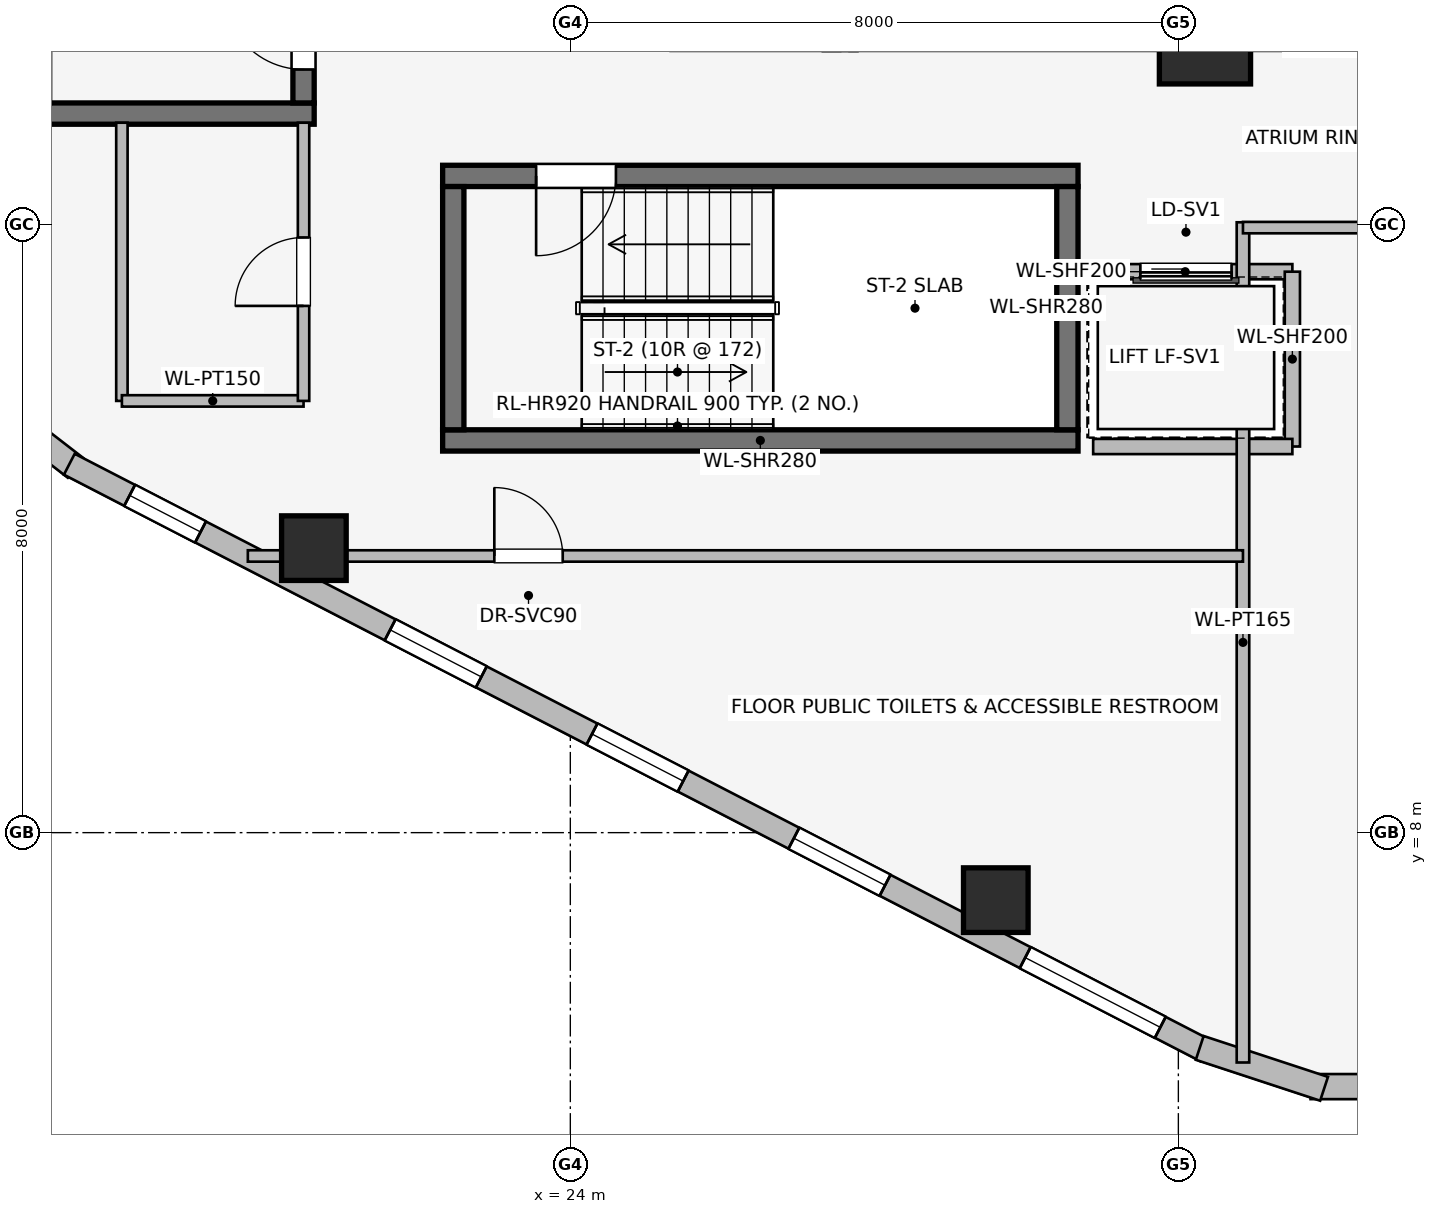
"""IFC4 building model, lengths in metres.
Left out: names, types, materials, properties, quantities, classifications, styles, units other than length and angle.
Written with IfcOpenShell. Run it as: python <this file> out.ifc"""

import sys

from ifc_helpers import new_model, si_unit, direction, frame, frame_2d, origin, origin_2d, place, context, subcontext, project, spatial, rectangle, extrude, element, fill, save


model = new_model("IFC4")
c1 = context("Model", 3, precision=1e-05, world=origin(), true_north=direction((0.0, 1.0)))
c2 = subcontext(c1, "Body", "Model", "MODEL_VIEW")
j1 = project(units=[si_unit("LENGTHUNIT", "METRE"), si_unit("PLANEANGLEUNIT", "RADIAN")], contexts=[c1])
p1 = place(None, origin())
s1 = spatial("IfcSite", under=j1, at=p1, CompositionType="ELEMENT")
p2 = place(p1, origin())
s2 = spatial("IfcBuilding", under=s1, at=p2, CompositionType="ELEMENT")
p3 = place(p2, frame((0.0, 0.0, 206.8)))
s3 = spatial("IfcBuildingStorey", under=s2, at=p3, CompositionType="ELEMENT", Elevation=206.8)
p4 = place(p3, frame((16.87, 17.46, 0.0), z_axis=(0.0, 0.0, 1.0), x_axis=(1.0, 0.0, 0.0)))
e1 = element("IfcWall", 1, at=p4, inside=s3, PredefinedType="SHEAR", context=c2, shape_type="SweptSolid", body=[
    extrude(rectangle(XDim=3.76, YDim=0.28, at=frame_2d((1.88, 0.0))), origin(), (0.0, 0.0, 1.0), 3.45),
])
p5 = place(p3, frame((20.49, 17.6, 0.0), z_axis=(0.0, 0.0, 1.0), x_axis=(0.0, 1.0, 0.0)))
e2 = element("IfcWall", 2, at=p5, inside=s3, PredefinedType="SHEAR", context=c2, shape_type="SweptSolid", body=[
    extrude(rectangle(XDim=7.8, YDim=0.28, at=frame_2d((3.9, 0.0))), origin(), (0.0, 0.0, 1.0), 3.45),
])
p6 = place(p5, frame((0.44, 0.0, 0.0)))
e3 = element("IfcOpeningElement", 3, at=p6, cuts=e2, PredefinedType="OPENING", context=c2, shape_type="SweptSolid", body=[
    extrude(rectangle(XDim=1.05, YDim=2.0, at=frame_2d((0.525, 1.0))), frame((0.0, 0.15, 0.0), z_axis=(0.0, -1.0, 0.0), x_axis=(1.0, 0.0, 0.0)), (0.0, 0.0, 1.0), 0.3),
])
p7 = place(p3, frame((22.32, 13.16, 0.0), z_axis=(0.0, 0.0, 1.0), x_axis=(1.0, 0.0, 0.0)))
e4 = element("IfcWall", 4, at=p7, inside=s3, PredefinedType="SHEAR", context=c2, shape_type="SweptSolid", body=[
    extrude(rectangle(XDim=8.36, YDim=0.28, at=frame_2d((4.18, 0.0))), origin(), (0.0, 0.0, 1.0), 3.45),
])
p8 = place(p3, frame((30.68, 16.64, 0.0), z_axis=(0.0, 0.0, 1.0), x_axis=(-1.0, 0.0, 0.0)))
e5 = element("IfcWall", 5, at=p8, inside=s3, PredefinedType="SHEAR", context=c2, shape_type="SweptSolid", body=[
    extrude(rectangle(XDim=8.36, YDim=0.28, at=frame_2d((4.18, 0.0))), origin(), (0.0, 0.0, 1.0), 3.45),
])
p9 = place(p8, frame((6.08, 0.0, 0.0)))
e6 = element("IfcOpeningElement", 6, at=p9, cuts=e5, PredefinedType="OPENING", context=c2, shape_type="SweptSolid", body=[
    extrude(rectangle(XDim=1.05, YDim=2.0, at=frame_2d((0.525, 1.0))), frame((0.0, 0.15, 0.0), z_axis=(0.0, -1.0, 0.0), x_axis=(1.0, 0.0, 0.0)), (0.0, 0.0, 1.0), 0.3),
])
for number, where, z_axis, x_axis in (
    (7, (22.46, 16.5, 0.0), (0.0, 0.0, 1.0), (0.0, -1.0, 0.0)),
    (8, (30.54, 13.3, 0.0), (0.0, 0.0, 1.0), (0.0, 1.0, 0.0)),
):
    element("IfcWall", number, at=place(p3, frame(where, z_axis=z_axis, x_axis=x_axis)), inside=s3, PredefinedType="SHEAR", context=c2, shape_type="SweptSolid", body=[
        extrude(rectangle(XDim=3.2, YDim=0.28, at=frame_2d((1.6, 0.0))), origin(), (0.0, 0.0, 1.0), 3.45),
    ])
p10 = place(p3, frame((32.35, 18.45, 0.0), z_axis=(0.0, 0.0, 1.0), x_axis=(1.0, 0.0, 0.0)))
e9 = element("IfcColumn", 9, at=p10, inside=s3, PredefinedType="COLUMN", context=c2, shape_type="SweptSolid", body=[
    extrude(rectangle(XDim=1.2, YDim=1.2, at=origin_2d()), origin(), (0.0, 0.0, 1.0), 3.45),
])
for number, where, z_axis, x_axis in (
    (10, (20.626, 11.743, 0.0), (0.0, 0.0, 1.0), (1.0, 0.0, 0.0)),
    (11, (29.598, 7.112, 0.0), (0.0, 0.0, 1.0), (1.0, 0.0, 0.0)),
):
    element("IfcColumn", number, at=place(p3, frame(where, z_axis=z_axis, x_axis=x_axis)), inside=s3, PredefinedType="COLUMN", context=c2, shape_type="SweptSolid", body=[
        extrude(rectangle(XDim=0.85, YDim=0.85, at=origin_2d()), origin(), (0.0, 0.0, 1.0), 3.45),
    ])
p11 = place(p3, frame((17.489, 12.8, 0.0), z_axis=(0.0, 0.0, 1.0), x_axis=(-0.791409877269, 0.611285862884, 0.0)))
e12 = element("IfcWall", 12, at=p11, inside=s3, PredefinedType="STANDARD", context=c2, shape_type="SweptSolid", body=[
    extrude(rectangle(XDim=1.677, YDim=0.33, at=frame_2d((0.838, 0.0))), origin(), (0.0, 0.0, 1.0), 3.19),
])
p12 = place(p3, frame((32.362, 5.129, 0.0), z_axis=(0.0, 0.0, 1.0), x_axis=(-0.888626188278, 0.458632202867, 0.0)))
e13 = element("IfcWall", 13, at=p12, inside=s3, PredefinedType="STANDARD", context=c2, shape_type="SweptSolid", body=[
    extrude(rectangle(XDim=16.828, YDim=0.31, at=frame_2d((8.414, 0.0))), origin(), (0.0, 0.0, 1.0), 3.19),
])
p13 = place(p12, frame((0.675, 0.0, 0.75)))
e14 = element("IfcOpeningElement", 14, at=p13, cuts=e13, PredefinedType="OPENING", context=c2, shape_type="SweptSolid", body=[
    extrude(rectangle(XDim=2.0, YDim=1.5, at=frame_2d((1.0, 0.75))), frame((0.0, 0.165, 0.0), z_axis=(0.0, -1.0, 0.0), x_axis=(1.0, 0.0, 0.0)), (0.0, 0.0, 1.0), 0.33),
])
p14 = place(p12, frame((4.75, 0.0, 0.75)))
e15 = element("IfcOpeningElement", 15, at=p14, cuts=e13, PredefinedType="OPENING", context=c2, shape_type="SweptSolid", body=[
    extrude(rectangle(XDim=1.35, YDim=1.45, at=frame_2d((0.675, 0.725))), frame((0.0, 0.165, 0.0), z_axis=(0.0, -1.0, 0.0), x_axis=(1.0, 0.0, 0.0)), (0.0, 0.0, 1.0), 0.33),
])
p15 = place(p12, frame((7.739, 0.0, 0.75)))
e16 = element("IfcOpeningElement", 16, at=p15, cuts=e13, PredefinedType="OPENING", context=c2, shape_type="SweptSolid", body=[
    extrude(rectangle(XDim=1.35, YDim=1.45, at=frame_2d((0.675, 0.725))), frame((0.0, 0.165, 0.0), z_axis=(0.0, -1.0, 0.0), x_axis=(1.0, 0.0, 0.0)), (0.0, 0.0, 1.0), 0.33),
])
p16 = place(p12, frame((10.728, 0.0, 0.75)))
e17 = element("IfcOpeningElement", 17, at=p16, cuts=e13, PredefinedType="OPENING", context=c2, shape_type="SweptSolid", body=[
    extrude(rectangle(XDim=1.35, YDim=1.45, at=frame_2d((0.675, 0.725))), frame((0.0, 0.165, 0.0), z_axis=(0.0, -1.0, 0.0), x_axis=(1.0, 0.0, 0.0)), (0.0, 0.0, 1.0), 0.33),
])
p17 = place(p12, frame((14.885, 0.0, 0.75)))
e18 = element("IfcOpeningElement", 18, at=p17, cuts=e13, PredefinedType="OPENING", context=c2, shape_type="SweptSolid", body=[
    extrude(rectangle(XDim=1.05, YDim=1.4, at=frame_2d((0.525, 0.7))), frame((0.0, 0.165, 0.0), z_axis=(0.0, -1.0, 0.0), x_axis=(1.0, 0.0, 0.0)), (0.0, 0.0, 1.0), 0.33),
])
p18 = place(p3, frame((35.461, 4.659, 0.0), z_axis=(0.0, 0.0, 1.0), x_axis=(-1.0, 0.0, 0.0)))
e19 = element("IfcWall", 19, at=p18, inside=s3, PredefinedType="STANDARD", context=c2, shape_type="SweptSolid", body=[
    extrude(rectangle(XDim=1.722, YDim=0.33, at=frame_2d((0.861, 0.0))), origin(), (0.0, 0.0, 1.0), 3.19),
])
p19 = place(p3, frame((33.917, 4.63, 0.0), z_axis=(0.0, 0.0, 1.0), x_axis=(-0.949937416267, 0.312440242569, 0.0)))
e20 = element("IfcWall", 20, at=p19, inside=s3, PredefinedType="STANDARD", context=c2, shape_type="SweptSolid", body=[
    extrude(rectangle(XDim=1.722, YDim=0.33, at=frame_2d((0.861, 0.0))), origin(), (0.0, 0.0, 1.0), 3.19),
])
p20 = place(p3, frame((33.5, 15.38, 0.0), z_axis=(0.0, 0.0, 1.0), x_axis=(-1.0, 0.0, 0.0)))
e21 = element("IfcWall", 21, at=p20, inside=s3, PredefinedType="PARTITIONING", context=c2, shape_type="SweptSolid", body=[
    extrude(rectangle(XDim=2.82, YDim=0.2, at=frame_2d((1.41, 0.0))), origin(), (0.0, 0.0, 1.0), 3.19),
])
p21 = place(p20, frame((0.8, 0.0, 0.0)))
e22 = element("IfcOpeningElement", 22, at=p21, cuts=e21, PredefinedType="OPENING", context=c2, shape_type="SweptSolid", body=[
    extrude(rectangle(XDim=1.2, YDim=2.2, at=frame_2d((0.6, 1.1))), frame((0.0, 0.11, 0.0), z_axis=(0.0, -1.0, 0.0), x_axis=(1.0, 0.0, 0.0)), (0.0, 0.0, 1.0), 0.22),
])
p22 = place(p3, frame((33.5, 13.08, 0.0), z_axis=(0.0, 0.0, 1.0), x_axis=(0.0, 1.0, 0.0)))
e23 = element("IfcWall", 23, at=p22, inside=s3, PredefinedType="PARTITIONING", context=c2, shape_type="SweptSolid", body=[
    extrude(rectangle(XDim=2.3, YDim=0.2, at=frame_2d((1.15, 0.0))), origin(), (0.0, 0.0, 1.0), 3.19),
])
p23 = place(p3, frame((30.879, 13.08, 0.0), z_axis=(0.0, 0.0, 1.0), x_axis=(1.0, 0.0, 0.0)))
e24 = element("IfcWall", 24, at=p23, inside=s3, PredefinedType="PARTITIONING", context=c2, shape_type="SweptSolid", body=[
    extrude(rectangle(XDim=2.621, YDim=0.2, at=frame_2d((1.311, 0.0))), origin(), (0.0, 0.0, 1.0), 3.19),
])
p24 = place(p3, frame((18.1, 17.34, 0.0), z_axis=(0.0, 0.0, 1.0), x_axis=(0.0, -1.0, 0.0)))
e25 = element("IfcWall", 25, at=p24, inside=s3, PredefinedType="PARTITIONING", context=c2, shape_type="SweptSolid", body=[
    extrude(rectangle(XDim=3.66, YDim=0.15, at=frame_2d((1.83, 0.0))), origin(), (0.0, 0.0, 1.0), 3.19),
])
p25 = place(p3, frame((18.1, 13.68, 0.0), z_axis=(0.0, 0.0, 1.0), x_axis=(1.0, 0.0, 0.0)))
e26 = element("IfcWall", 26, at=p25, inside=s3, PredefinedType="PARTITIONING", context=c2, shape_type="SweptSolid", body=[
    extrude(rectangle(XDim=2.39, YDim=0.15, at=frame_2d((1.195, 0.0))), origin(), (0.0, 0.0, 1.0), 3.19),
])
p26 = place(p3, frame((20.49, 13.68, 0.0), z_axis=(0.0, 0.0, 1.0), x_axis=(0.0, 1.0, 0.0)))
e27 = element("IfcWall", 27, at=p26, inside=s3, PredefinedType="PARTITIONING", context=c2, shape_type="SweptSolid", body=[
    extrude(rectangle(XDim=3.66, YDim=0.15, at=frame_2d((1.83, 0.0))), origin(), (0.0, 0.0, 1.0), 3.19),
])
p27 = place(p26, frame((1.25, 0.0, 0.0)))
e28 = element("IfcOpeningElement", 28, at=p27, cuts=e27, PredefinedType="OPENING", context=c2, shape_type="SweptSolid", body=[
    extrude(rectangle(XDim=0.9, YDim=2.0, at=frame_2d((0.45, 1.0))), frame((0.0, 0.085, 0.0), z_axis=(0.0, -1.0, 0.0), x_axis=(1.0, 0.0, 0.0)), (0.0, 0.0, 1.0), 0.17),
])
p28 = place(p3, frame((32.85, 4.976, 0.0), z_axis=(0.0, 0.0, 1.0), x_axis=(0.0, 1.0, 0.0)))
e29 = element("IfcWall", 29, at=p28, inside=s3, PredefinedType="PARTITIONING", context=c2, shape_type="SweptSolid", body=[
    extrude(rectangle(XDim=11.054, YDim=0.165, at=frame_2d((5.527, 0.0))), origin(), (0.0, 0.0, 1.0), 3.19),
])
p29 = place(p3, frame((19.757, 11.64, 0.0), z_axis=(0.0, 0.0, 1.0), x_axis=(1.0, 0.0, 0.0)))
e30 = element("IfcWall", 30, at=p29, inside=s3, PredefinedType="PARTITIONING", context=c2, shape_type="SweptSolid", body=[
    extrude(rectangle(XDim=13.093, YDim=0.15, at=frame_2d((6.546, 0.0))), origin(), (0.0, 0.0, 1.0), 3.19),
])
p30 = place(p29, frame((3.243, 0.0, 0.0)))
e31 = element("IfcOpeningElement", 31, at=p30, cuts=e30, PredefinedType="OPENING", context=c2, shape_type="SweptSolid", body=[
    extrude(rectangle(XDim=0.9, YDim=2.0, at=frame_2d((0.45, 1.0))), frame((0.0, 0.085, 0.0), z_axis=(0.0, -1.0, 0.0), x_axis=(1.0, 0.0, 0.0)), (0.0, 0.0, 1.0), 0.17),
])
p31 = place(p3, frame((32.85, 15.96, 0.0), z_axis=(0.0, 0.0, 1.0), x_axis=(1.0, 0.0, 0.0)))
e32 = element("IfcWall", 32, at=p31, inside=s3, PredefinedType="PARTITIONING", context=c2, shape_type="SweptSolid", body=[
    extrude(rectangle(XDim=8.61, YDim=0.15, at=frame_2d((4.305, 0.0))), origin(), (0.0, 0.0, 1.0), 3.19),
])
p32 = place(p31, frame((3.825, 0.0, 0.0)))
e33 = element("IfcOpeningElement", 33, at=p32, cuts=e32, PredefinedType="OPENING", context=c2, shape_type="SweptSolid", body=[
    extrude(rectangle(XDim=0.96, YDim=2.0, at=frame_2d((0.48, 1.0))), frame((0.0, 0.085, 0.0), z_axis=(0.0, -1.0, 0.0), x_axis=(1.0, 0.0, 0.0)), (0.0, 0.0, 1.0), 0.17),
])
p33 = place(p13, origin())
e34 = element("IfcWindow", 34, at=p33, inside=s3, PartitioningType="SINGLE_PANEL", PredefinedType="WINDOW", context=c2, shape_type="SweptSolid", body=[
    extrude(rectangle(XDim=2.0, YDim=1.5, at=frame_2d((1.0, 0.75))), frame((0.0, 0.03, 0.0), z_axis=(0.0, -1.0, 0.0), x_axis=(1.0, 0.0, 0.0)), (0.0, 0.0, 1.0), 0.06),
])
fill(e14, e34)
p34 = place(p14, origin())
e35 = element("IfcWindow", 35, at=p34, inside=s3, PartitioningType="SINGLE_PANEL", PredefinedType="WINDOW", context=c2, shape_type="SweptSolid", body=[
    extrude(rectangle(XDim=1.35, YDim=1.45, at=frame_2d((0.675, 0.725))), frame((0.0, 0.03, 0.0), z_axis=(0.0, -1.0, 0.0), x_axis=(1.0, 0.0, 0.0)), (0.0, 0.0, 1.0), 0.06),
])
fill(e15, e35)
p35 = place(p15, origin())
e36 = element("IfcWindow", 36, at=p35, inside=s3, PartitioningType="SINGLE_PANEL", PredefinedType="WINDOW", context=c2, shape_type="SweptSolid", body=[
    extrude(rectangle(XDim=1.35, YDim=1.45, at=frame_2d((0.675, 0.725))), frame((0.0, 0.03, 0.0), z_axis=(0.0, -1.0, 0.0), x_axis=(1.0, 0.0, 0.0)), (0.0, 0.0, 1.0), 0.06),
])
fill(e16, e36)
p36 = place(p16, origin())
e37 = element("IfcWindow", 37, at=p36, inside=s3, PartitioningType="SINGLE_PANEL", PredefinedType="WINDOW", context=c2, shape_type="SweptSolid", body=[
    extrude(rectangle(XDim=1.35, YDim=1.45, at=frame_2d((0.675, 0.725))), frame((0.0, 0.03, 0.0), z_axis=(0.0, -1.0, 0.0), x_axis=(1.0, 0.0, 0.0)), (0.0, 0.0, 1.0), 0.06),
])
fill(e17, e37)
p37 = place(p17, origin())
e38 = element("IfcWindow", 38, at=p37, inside=s3, PartitioningType="SINGLE_PANEL", PredefinedType="WINDOW", context=c2, shape_type="SweptSolid", body=[
    extrude(rectangle(XDim=1.05, YDim=1.4, at=frame_2d((0.525, 0.7))), frame((0.0, 0.03, 0.0), z_axis=(0.0, -1.0, 0.0), x_axis=(1.0, 0.0, 0.0)), (0.0, 0.0, 1.0), 0.06),
])
fill(e18, e38)
p38 = place(p6, origin())
e39 = element("IfcDoor", 39, at=p38, inside=s3, OperationType="SINGLE_SWING_RIGHT", PredefinedType="DOOR", context=c2, shape_type="SweptSolid", body=[
    extrude(rectangle(XDim=1.05, YDim=2.0, at=frame_2d((0.525, 1.0))), frame((0.0, 0.025, 0.0), z_axis=(0.0, -1.0, 0.0), x_axis=(1.0, 0.0, 0.0)), (0.0, 0.0, 1.0), 0.05),
])
fill(e3, e39)
p39 = place(p9, origin())
e40 = element("IfcDoor", 40, at=p39, inside=s3, OperationType="SINGLE_SWING_RIGHT", PredefinedType="DOOR", context=c2, shape_type="SweptSolid", body=[
    extrude(rectangle(XDim=1.05, YDim=2.0, at=frame_2d((0.525, 1.0))), frame((0.0, 0.025, 0.0), z_axis=(0.0, -1.0, 0.0), x_axis=(1.0, 0.0, 0.0)), (0.0, 0.0, 1.0), 0.05),
])
fill(e6, e40)
p40 = place(p21, origin())
e41 = element("IfcDoor", 41, at=p40, inside=s3, OperationType="SLIDING_TO_RIGHT", PredefinedType="DOOR", context=c2, shape_type="SweptSolid", body=[
    extrude(rectangle(XDim=1.2, YDim=2.2, at=frame_2d((0.6, 1.1))), frame((0.0, 0.025, 0.0), z_axis=(0.0, -1.0, 0.0), x_axis=(1.0, 0.0, 0.0)), (0.0, 0.0, 1.0), 0.05),
])
fill(e22, e41)
p41 = place(p27, origin())
e42 = element("IfcDoor", 42, at=p41, inside=s3, OperationType="SINGLE_SWING_LEFT", PredefinedType="DOOR", context=c2, shape_type="SweptSolid", body=[
    extrude(rectangle(XDim=0.9, YDim=2.0, at=frame_2d((0.45, 1.0))), frame((0.0, 0.025, 0.0), z_axis=(0.0, -1.0, 0.0), x_axis=(1.0, 0.0, 0.0)), (0.0, 0.0, 1.0), 0.05),
])
fill(e28, e42)
p42 = place(p30, origin())
e43 = element("IfcDoor", 43, at=p42, inside=s3, OperationType="SINGLE_SWING_LEFT", PredefinedType="DOOR", context=c2, shape_type="SweptSolid", body=[
    extrude(rectangle(XDim=0.9, YDim=2.0, at=frame_2d((0.45, 1.0))), frame((0.0, 0.025, 0.0), z_axis=(0.0, -1.0, 0.0), x_axis=(1.0, 0.0, 0.0)), (0.0, 0.0, 1.0), 0.05),
])
fill(e31, e43)
save(model, sys.argv[1])
